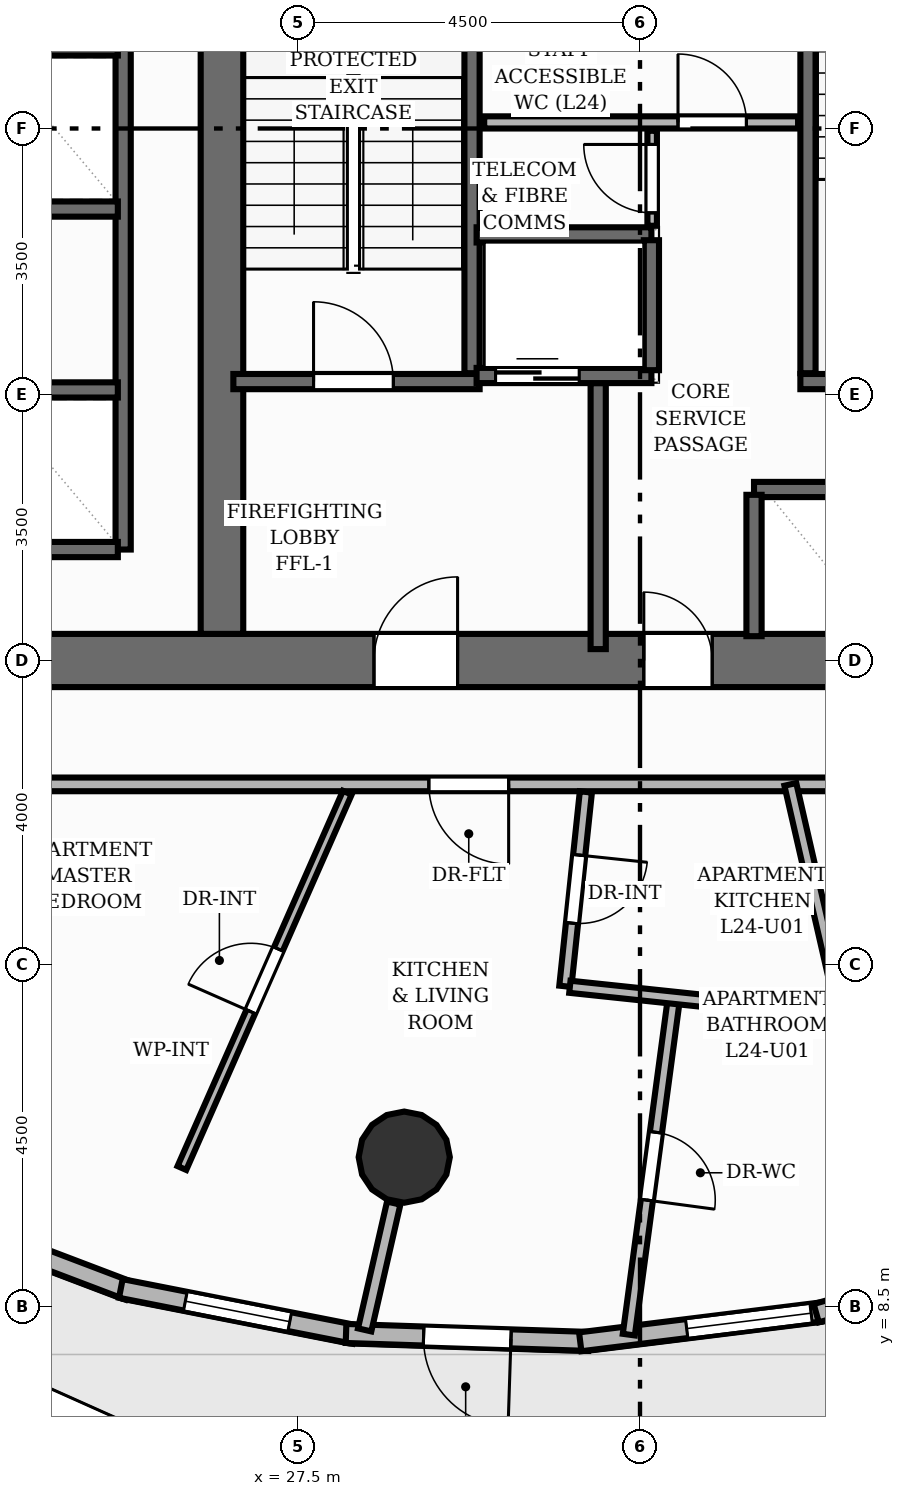
"""IFC4 building model, lengths in metres.
Left out: names, types, materials, properties, quantities, classifications, styles, units other than length and angle.
Written with IfcOpenShell. Run it as: python <this file> out.ifc"""

import sys

from ifc_helpers import new_model, si_unit, direction, frame, frame_2d, origin, origin_2d, place, context, subcontext, project, spatial, rectangle, circle, extrude, element, fill, save


model = new_model("IFC4")
c1 = context("Model", 3, precision=1e-05, world=origin(), true_north=direction((0.0, 1.0)))
c2 = subcontext(c1, "Body", "Model", "MODEL_VIEW")
j1 = project(units=[si_unit("LENGTHUNIT", "METRE"), si_unit("PLANEANGLEUNIT", "RADIAN")], contexts=[c1])
p1 = place(None, origin())
s1 = spatial("IfcSite", under=j1, at=p1, CompositionType="ELEMENT")
p2 = place(p1, origin())
s2 = spatial("IfcBuilding", under=s1, at=p2, CompositionType="ELEMENT")
p3 = place(p2, frame((0.0, 0.0, 83.68)))
s3 = spatial("IfcBuildingStorey", under=s2, at=p3, CompositionType="ELEMENT", Elevation=83.68)
p4 = place(p3, frame((22.65, 17.0, 0.0), z_axis=(0.0, 0.0, 1.0), x_axis=(1.0, 0.0, 0.0)))
e1 = element("IfcWall", 1, at=p4, inside=s3, PredefinedType="SHEAR", context=c2, shape_type="SweptSolid", body=[
    extrude(rectangle(XDim=18.7, YDim=0.7, at=frame_2d((9.35, 0.0))), origin(), (0.0, 0.0, 1.0), 3.2),
])
p5 = place(p4, frame((5.85, 0.0, 0.0)))
e2 = element("IfcOpeningElement", 2, at=p5, cuts=e1, PredefinedType="OPENING", context=c2, shape_type="SweptSolid", body=[
    extrude(rectangle(XDim=1.1, YDim=2.15, at=frame_2d((0.55, 1.075))), frame((0.0, 0.36, 0.0), z_axis=(0.0, -1.0, 0.0), x_axis=(1.0, 0.0, 0.0)), (0.0, 0.0, 1.0), 0.72),
])
p6 = place(p4, frame((9.4, 0.0, 0.0)))
e3 = element("IfcOpeningElement", 3, at=p6, cuts=e1, PredefinedType="OPENING", context=c2, shape_type="SweptSolid", body=[
    extrude(rectangle(XDim=0.9, YDim=2.1, at=frame_2d((0.45, 1.05))), frame((0.0, 0.36, 0.0), z_axis=(0.0, -1.0, 0.0), x_axis=(1.0, 0.0, 0.0)), (0.0, 0.0, 1.0), 0.72),
])
p7 = place(p3, frame((26.5, 17.35, 0.0), z_axis=(0.0, 0.0, 1.0), x_axis=(0.0, 1.0, 0.0)))
e4 = element("IfcWall", 4, at=p7, inside=s3, PredefinedType="SHEAR", context=c2, shape_type="SweptSolid", body=[
    extrude(rectangle(XDim=13.3, YDim=0.56, at=frame_2d((6.65, 0.0))), origin(), (0.0, 0.0, 1.0), 3.2),
])
p8 = place(p3, frame((28.898, 10.465, 0.0), z_axis=(0.0, 0.0, 1.0), x_axis=(1.0, 0.0, 0.0)))
e5 = element("IfcColumn", 5, at=p8, inside=s3, PredefinedType="COLUMN", context=c2, shape_type="SweptSolid", body=[
    extrude(circle(Radius=0.6, at=origin_2d()), origin(), (0.0, 0.0, 1.0), 3.2),
])
p9 = place(p3, frame((25.276, 8.707, 0.0), z_axis=(0.0, 0.0, 1.0), x_axis=(-0.934815891493, 0.355132720277, 0.0)))
e6 = element("IfcWall", 6, at=p9, inside=s3, PredefinedType="SOLIDWALL", context=c2, shape_type="SweptSolid", body=[
    extrude(rectangle(XDim=3.061, YDim=0.25, at=frame_2d((1.53, 0.0))), origin(), (0.0, 0.0, 1.0), 2.96),
])
p10 = place(p3, frame((28.242, 8.133, 0.0), z_axis=(0.0, 0.0, 1.0), x_axis=(-0.981187677549, 0.193056316721, 0.0)))
e7 = element("IfcWall", 7, at=p10, inside=s3, PredefinedType="SOLIDWALL", context=c2, shape_type="SweptSolid", body=[
    extrude(rectangle(XDim=3.131, YDim=0.25, at=frame_2d((1.565, 0.0))), origin(), (0.0, 0.0, 1.0), 2.96),
])
p11 = place(p10, frame((0.866, 0.0, 0.85)))
e8 = element("IfcOpeningElement", 8, at=p11, cuts=e7, PredefinedType="OPENING", context=c2, shape_type="SweptSolid", body=[
    extrude(rectangle(XDim=1.4, YDim=1.55, at=frame_2d((0.7, 0.775))), frame((0.0, 0.135, 0.0), z_axis=(0.0, -1.0, 0.0), x_axis=(1.0, 0.0, 0.0)), (0.0, 0.0, 1.0), 0.27),
])
p12 = place(p3, frame((31.323, 8.041, 0.0), z_axis=(0.0, 0.0, 1.0), x_axis=(-0.999464092211, 0.032734208101, 0.0)))
e9 = element("IfcWall", 9, at=p12, inside=s3, PredefinedType="SOLIDWALL", context=c2, shape_type="SweptSolid", body=[
    extrude(rectangle(XDim=3.192, YDim=0.25, at=frame_2d((1.596, 0.0))), origin(), (0.0, 0.0, 1.0), 2.96),
])
p13 = place(p12, frame((1.021, 0.0, 0.0)))
e10 = element("IfcOpeningElement", 10, at=p13, cuts=e9, PredefinedType="OPENING", context=c2, shape_type="SweptSolid", body=[
    extrude(rectangle(XDim=1.15, YDim=2.2, at=frame_2d((0.575, 1.1))), frame((0.0, 0.135, 0.0), z_axis=(0.0, -1.0, 0.0), x_axis=(1.0, 0.0, 0.0)), (0.0, 0.0, 1.0), 0.27),
])
p14 = place(p3, frame((34.425, 8.434, 0.0), z_axis=(0.0, 0.0, 1.0), x_axis=(-0.99241077266, -0.122966899235, 0.0)))
e11 = element("IfcWall", 11, at=p14, inside=s3, PredefinedType="SOLIDWALL", context=c2, shape_type="SweptSolid", body=[
    extrude(rectangle(XDim=3.236, YDim=0.25, at=frame_2d((1.618, 0.0))), origin(), (0.0, 0.0, 1.0), 2.96),
])
p15 = place(p14, frame((0.175, 0.0, 0.85)))
e12 = element("IfcOpeningElement", 12, at=p15, cuts=e11, PredefinedType="OPENING", context=c2, shape_type="SweptSolid", body=[
    extrude(rectangle(XDim=1.65, YDim=1.55, at=frame_2d((0.825, 0.775))), frame((0.0, 0.135, 0.0), z_axis=(0.0, -1.0, 0.0), x_axis=(1.0, 0.0, 0.0)), (0.0, 0.0, 1.0), 0.27),
])
p16 = place(p3, frame((37.455, 9.301, 0.0), z_axis=(0.0, 0.0, 1.0), x_axis=(-0.962134911526, -0.272573681825, 0.0)))
e13 = element("IfcWall", 13, at=p16, inside=s3, PredefinedType="SOLIDWALL", context=c2, shape_type="SweptSolid", body=[
    extrude(rectangle(XDim=3.26, YDim=0.25, at=frame_2d((1.63, 0.0))), origin(), (0.0, 0.0, 1.0), 2.96),
])
p17 = place(p3, frame((29.79, 20.78, 0.0), z_axis=(0.0, 0.0, 1.0), x_axis=(0.0, 1.0, 0.0)))
e14 = element("IfcWall", 14, at=p17, inside=s3, PredefinedType="SHEAR", context=c2, shape_type="SweptSolid", body=[
    extrude(rectangle(XDim=6.44, YDim=0.2, at=frame_2d((3.22, 0.0))), origin(), (0.0, 0.0, 1.0), 3.2),
])
p18 = place(p3, frame((26.65, 20.67, 0.0), z_axis=(0.0, 0.0, 1.0), x_axis=(1.0, 0.0, 0.0)))
e15 = element("IfcWall", 15, at=p18, inside=s3, PredefinedType="SHEAR", context=c2, shape_type="SweptSolid", body=[
    extrude(rectangle(XDim=3.24, YDim=0.2, at=frame_2d((1.62, 0.0))), origin(), (0.0, 0.0, 1.0), 3.2),
])
p19 = place(p18, frame((1.055, 0.0, 0.0)))
e16 = element("IfcOpeningElement", 16, at=p19, cuts=e15, PredefinedType="OPENING", context=c2, shape_type="SweptSolid", body=[
    extrude(rectangle(XDim=1.05, YDim=2.15, at=frame_2d((0.525, 1.075))), frame((0.0, 0.11, 0.0), z_axis=(0.0, -1.0, 0.0), x_axis=(1.0, 0.0, 0.0)), (0.0, 0.0, 1.0), 0.22),
])
p20 = place(p3, frame((34.21, 20.78, 0.0), z_axis=(0.0, 0.0, 1.0), x_axis=(0.0, 1.0, 0.0)))
e17 = element("IfcWall", 17, at=p20, inside=s3, PredefinedType="SHEAR", context=c2, shape_type="SweptSolid", body=[
    extrude(rectangle(XDim=6.44, YDim=0.2, at=frame_2d((3.22, 0.0))), origin(), (0.0, 0.0, 1.0), 3.2),
])
p21 = place(p3, frame((34.11, 20.67, 0.0), z_axis=(0.0, 0.0, 1.0), x_axis=(1.0, 0.0, 0.0)))
e18 = element("IfcWall", 18, at=p21, inside=s3, PredefinedType="SHEAR", context=c2, shape_type="SweptSolid", body=[
    extrude(rectangle(XDim=3.24, YDim=0.2, at=frame_2d((1.62, 0.0))), origin(), (0.0, 0.0, 1.0), 3.2),
])
p22 = place(p3, frame((31.45, 17.15, 0.0), z_axis=(0.0, 0.0, 1.0), x_axis=(0.0, 1.0, 0.0)))
e19 = element("IfcWall", 19, at=p22, inside=s3, PredefinedType="SHEAR", context=c2, shape_type="SweptSolid", body=[
    extrude(rectangle(XDim=3.5, YDim=0.2, at=frame_2d((1.75, 0.0))), origin(), (0.0, 0.0, 1.0), 3.2),
])
p23 = place(p3, frame((29.85, 20.75, 0.0), z_axis=(0.0, 0.0, 1.0), x_axis=(1.0, 0.0, 0.0)))
e20 = element("IfcWall", 20, at=p23, inside=s3, PredefinedType="SHEAR", context=c2, shape_type="SweptSolid", body=[
    extrude(rectangle(XDim=2.3, YDim=0.2, at=frame_2d((1.15, 0.0))), origin(), (0.0, 0.0, 1.0), 3.2),
])
p24 = place(p23, frame((0.25, 0.0, 0.0)))
e21 = element("IfcOpeningElement", 21, at=p24, cuts=e20, PredefinedType="OPENING", context=c2, shape_type="SweptSolid", body=[
    extrude(rectangle(XDim=1.1, YDim=2.15, at=frame_2d((0.55, 1.075))), frame((0.0, 0.11, 0.0), z_axis=(0.0, -1.0, 0.0), x_axis=(1.0, 0.0, 0.0)), (0.0, 0.0, 1.0), 0.22),
])
p25 = place(p3, frame((29.85, 22.6, 0.0), z_axis=(0.0, 0.0, 1.0), x_axis=(1.0, 0.0, 0.0)))
e22 = element("IfcWall", 22, at=p25, inside=s3, PredefinedType="SHEAR", context=c2, shape_type="SweptSolid", body=[
    extrude(rectangle(XDim=2.3, YDim=0.2, at=frame_2d((1.15, 0.0))), origin(), (0.0, 0.0, 1.0), 3.2),
])
p26 = place(p3, frame((32.15, 20.82, 0.0), z_axis=(0.0, 0.0, 1.0), x_axis=(0.0, 1.0, 0.0)))
e23 = element("IfcWall", 23, at=p26, inside=s3, PredefinedType="SHEAR", context=c2, shape_type="SweptSolid", body=[
    extrude(rectangle(XDim=1.71, YDim=0.2, at=frame_2d((0.855, 0.0))), origin(), (0.0, 0.0, 1.0), 3.2),
])
p27 = place(p3, frame((25.2, 18.46, 0.0), z_axis=(0.0, 0.0, 1.0), x_axis=(0.0, 1.0, 0.0)))
e24 = element("IfcWall", 24, at=p27, inside=s3, PredefinedType="SHEAR", context=c2, shape_type="SweptSolid", body=[
    extrude(rectangle(XDim=11.08, YDim=0.2, at=frame_2d((5.54, 0.0))), origin(), (0.0, 0.0, 1.0), 3.2),
])
for number, where, z_axis, x_axis in (
    (25, (23.42, 18.46, 0.0), (0.0, 0.0, 1.0), (1.0, 0.0, 0.0)),
    (26, (23.42, 20.56, 0.0), (0.0, 0.0, 1.0), (1.0, 0.0, 0.0)),
    (27, (23.42, 22.94, 0.0), (0.0, 0.0, 1.0), (1.0, 0.0, 0.0)),
    (28, (23.42, 25.06, 0.0), (0.0, 0.0, 1.0), (1.0, 0.0, 0.0)),
):
    element("IfcWall", number, at=place(p3, frame(where, z_axis=z_axis, x_axis=x_axis)), inside=s3, PredefinedType="SHEAR", context=c2, shape_type="SweptSolid", body=[
        extrude(rectangle(XDim=1.71, YDim=0.2, at=frame_2d((0.855, 0.0))), origin(), (0.0, 0.0, 1.0), 3.2),
    ])
p28 = place(p3, frame((33.5, 19.25, 0.0), z_axis=(0.0, 0.0, 1.0), x_axis=(1.0, 0.0, 0.0)))
e29 = element("IfcWall", 29, at=p28, inside=s3, PredefinedType="SHEAR", context=c2, shape_type="SweptSolid", body=[
    extrude(rectangle(XDim=3.72, YDim=0.2, at=frame_2d((1.86, 0.0))), origin(), (0.0, 0.0, 1.0), 3.2),
])
p29 = place(p3, frame((33.5, 17.32, 0.0), z_axis=(0.0, 0.0, 1.0), x_axis=(0.0, 1.0, 0.0)))
e30 = element("IfcWall", 30, at=p29, inside=s3, PredefinedType="SHEAR", context=c2, shape_type="SweptSolid", body=[
    extrude(rectangle(XDim=1.86, YDim=0.2, at=frame_2d((0.93, 0.0))), origin(), (0.0, 0.0, 1.0), 3.2),
])
p30 = place(p3, frame((29.95, 24.08, 0.0), z_axis=(0.0, 0.0, 1.0), x_axis=(1.0, 0.0, 0.0)))
e31 = element("IfcWall", 31, at=p30, inside=s3, PredefinedType="PLUMBINGWALL", context=c2, shape_type="SweptSolid", body=[
    extrude(rectangle(XDim=4.13, YDim=0.16, at=frame_2d((2.065, 0.0))), origin(), (0.0, 0.0, 1.0), 2.955),
])
p31 = place(p30, frame((2.55, 0.0, 0.0)))
e32 = element("IfcOpeningElement", 32, at=p31, cuts=e31, PredefinedType="OPENING", context=c2, shape_type="SweptSolid", body=[
    extrude(rectangle(XDim=0.9, YDim=2.1, at=frame_2d((0.45, 1.05))), frame((0.0, 0.09, 0.0), z_axis=(0.0, -1.0, 0.0), x_axis=(1.0, 0.0, 0.0)), (0.0, 0.0, 1.0), 0.18),
])
p32 = place(p3, frame((32.16, 22.72, 0.0), z_axis=(0.0, 0.0, 1.0), x_axis=(0.0, 1.0, 0.0)))
e33 = element("IfcWall", 33, at=p32, inside=s3, PredefinedType="PARTITIONING", context=c2, shape_type="SweptSolid", body=[
    extrude(rectangle(XDim=1.25, YDim=0.125, at=frame_2d((0.625, 0.0))), origin(), (0.0, 0.0, 1.0), 2.955),
])
p33 = place(p32, frame((0.17, 0.0, 0.0)))
e34 = element("IfcOpeningElement", 34, at=p33, cuts=e33, PredefinedType="OPENING", context=c2, shape_type="SweptSolid", body=[
    extrude(rectangle(XDim=0.9, YDim=2.1, at=frame_2d((0.45, 1.05))), frame((0.0, 0.073, 0.0), z_axis=(0.0, -1.0, 0.0), x_axis=(1.0, 0.0, 0.0)), (0.0, 0.0, 1.0), 0.145),
])
p34 = place(p3, frame((28.76, 9.861, 0.0), z_axis=(0.0, 0.0, 1.0), x_axis=(-0.223359217097, -0.974736200281, 0.0)))
e35 = element("IfcWall", 35, at=p34, inside=s3, PredefinedType="PARTITIONING", context=c2, shape_type="SweptSolid", body=[
    extrude(rectangle(XDim=1.712, YDim=0.18, at=frame_2d((0.856, 0.0))), origin(), (0.0, 0.0, 1.0), 2.261),
])
p35 = place(p3, frame((41.695, 15.37, 0.0), z_axis=(0.0, 0.0, 1.0), x_axis=(-1.0, 0.0, 0.0)))
e36 = element("IfcWall", 36, at=p35, inside=s3, PredefinedType="PARTITIONING", context=c2, shape_type="SweptSolid", body=[
    extrude(rectangle(XDim=20.325, YDim=0.18, at=frame_2d((10.163, 0.0))), origin(), (0.0, 0.0, 1.0), 2.955),
])
p36 = place(p35, frame((11.424, 0.0, 0.0)))
e37 = element("IfcOpeningElement", 37, at=p36, cuts=e36, PredefinedType="OPENING", context=c2, shape_type="SweptSolid", body=[
    extrude(rectangle(XDim=1.05, YDim=2.15, at=frame_2d((0.525, 1.075))), frame((0.0, 0.1, 0.0), z_axis=(0.0, -1.0, 0.0), x_axis=(1.0, 0.0, 0.0)), (0.0, 0.0, 1.0), 0.2),
])
p37 = place(p3, frame((32.448, 12.562, 0.0), z_axis=(0.0, 0.0, 1.0), x_axis=(-0.132986130607, -0.991117898671, 0.0)))
e38 = element("IfcWall", 38, at=p37, inside=s3, PredefinedType="PLUMBINGWALL", context=c2, shape_type="SweptSolid", body=[
    extrude(rectangle(XDim=4.472, YDim=0.16, at=frame_2d((2.236, 0.0))), origin(), (0.0, 0.0, 1.0), 2.955),
])
p38 = place(p37, frame((1.786, 0.0, 0.0)))
e39 = element("IfcOpeningElement", 39, at=p38, cuts=e38, PredefinedType="OPENING", context=c2, shape_type="SweptSolid", body=[
    extrude(rectangle(XDim=0.9, YDim=2.1, at=frame_2d((0.45, 1.05))), frame((0.0, 0.09, 0.0), z_axis=(0.0, -1.0, 0.0), x_axis=(1.0, 0.0, 0.0)), (0.0, 0.0, 1.0), 0.18),
])
p39 = place(p3, frame((25.973, 10.322, 0.0), z_axis=(0.0, 0.0, 1.0), x_axis=(0.403235845427, 0.91509608947, 0.0)))
e40 = element("IfcWall", 40, at=p39, inside=s3, PredefinedType="PARTITIONING", context=c2, shape_type="SweptSolid", body=[
    extrude(rectangle(XDim=5.396, YDim=0.125, at=frame_2d((2.698, 0.0))), origin(), (0.0, 0.0, 1.0), 2.955),
])
p40 = place(p39, frame((2.248, 0.0, 0.0)))
e41 = element("IfcOpeningElement", 41, at=p40, cuts=e40, PredefinedType="OPENING", context=c2, shape_type="SweptSolid", body=[
    extrude(rectangle(XDim=0.9, YDim=2.1, at=frame_2d((0.45, 1.05))), frame((0.0, 0.073, 0.0), z_axis=(0.0, -1.0, 0.0), x_axis=(1.0, 0.0, 0.0)), (0.0, 0.0, 1.0), 0.145),
])
p41 = place(p3, frame((31.288, 15.271, 0.0), z_axis=(0.0, 0.0, 1.0), x_axis=(-0.105094954285, -0.994462191631, 0.0)))
e42 = element("IfcWall", 42, at=p41, inside=s3, PredefinedType="PLUMBINGWALL", context=c2, shape_type="SweptSolid", body=[
    extrude(rectangle(XDim=2.572, YDim=0.16, at=frame_2d((1.286, 0.0))), origin(), (0.0, 0.0, 1.0), 2.641),
])
p42 = place(p41, frame((0.836, 0.0, 0.0)))
e43 = element("IfcOpeningElement", 43, at=p42, cuts=e42, PredefinedType="OPENING", context=c2, shape_type="SweptSolid", body=[
    extrude(rectangle(XDim=0.9, YDim=2.1, at=frame_2d((0.45, 1.05))), frame((0.0, 0.09, 0.0), z_axis=(0.0, -1.0, 0.0), x_axis=(1.0, 0.0, 0.0)), (0.0, 0.0, 1.0), 0.18),
])
p43 = place(p3, frame((31.077, 12.707, 0.0), z_axis=(0.0, 0.0, 1.0), x_axis=(0.994472124215, -0.105000924563, 0.0)))
e44 = element("IfcWall", 44, at=p43, inside=s3, PredefinedType="PLUMBINGWALL", context=c2, shape_type="SweptSolid", body=[
    extrude(rectangle(XDim=3.618, YDim=0.16, at=frame_2d((1.809, 0.0))), origin(), (0.0, 0.0, 1.0), 2.955),
])
p44 = place(p3, frame((33.978, 15.37, 0.0), z_axis=(0.0, 0.0, 1.0), x_axis=(0.223321757884, -0.974744783241, 0.0)))
e45 = element("IfcWall", 45, at=p44, inside=s3, PredefinedType="PLUMBINGWALL", context=c2, shape_type="SweptSolid", body=[
    extrude(rectangle(XDim=4.442, YDim=0.16, at=frame_2d((2.221, 0.0))), origin(), (0.0, 0.0, 1.0), 2.261),
])
p45 = place(p13, origin())
e46 = element("IfcDoor", 46, at=p45, inside=s3, OperationType="SINGLE_SWING_LEFT", PredefinedType="DOOR", context=c2, shape_type="SweptSolid", body=[
    extrude(rectangle(XDim=1.15, YDim=2.2, at=frame_2d((0.575, 1.1))), frame((0.0, 0.025, 0.0), z_axis=(0.0, -1.0, 0.0), x_axis=(1.0, 0.0, 0.0)), (0.0, 0.0, 1.0), 0.05),
])
fill(e10, e46)
p46 = place(p11, origin())
e47 = element("IfcWindow", 47, at=p46, inside=s3, PartitioningType="SINGLE_PANEL", PredefinedType="WINDOW", context=c2, shape_type="SweptSolid", body=[
    extrude(rectangle(XDim=1.4, YDim=1.55, at=frame_2d((0.7, 0.775))), frame((0.0, 0.03, 0.0), z_axis=(0.0, -1.0, 0.0), x_axis=(1.0, 0.0, 0.0)), (0.0, 0.0, 1.0), 0.06),
])
fill(e8, e47)
p47 = place(p15, origin())
e48 = element("IfcWindow", 48, at=p47, inside=s3, PartitioningType="SINGLE_PANEL", PredefinedType="WINDOW", context=c2, shape_type="SweptSolid", body=[
    extrude(rectangle(XDim=1.65, YDim=1.55, at=frame_2d((0.825, 0.775))), frame((0.0, 0.03, 0.0), z_axis=(0.0, -1.0, 0.0), x_axis=(1.0, 0.0, 0.0)), (0.0, 0.0, 1.0), 0.06),
])
fill(e12, e48)
p48 = place(p19, origin())
e49 = element("IfcDoor", 49, at=p48, inside=s3, OperationType="SINGLE_SWING_LEFT", PredefinedType="DOOR", context=c2, shape_type="SweptSolid", body=[
    extrude(rectangle(XDim=1.05, YDim=2.15, at=frame_2d((0.525, 1.075))), frame((0.0, 0.025, 0.0), z_axis=(0.0, -1.0, 0.0), x_axis=(1.0, 0.0, 0.0)), (0.0, 0.0, 1.0), 0.05),
])
fill(e16, e49)
p49 = place(p5, origin())
e50 = element("IfcDoor", 50, at=p49, inside=s3, OperationType="SINGLE_SWING_RIGHT", PredefinedType="DOOR", context=c2, shape_type="SweptSolid", body=[
    extrude(rectangle(XDim=1.1, YDim=2.15, at=frame_2d((0.55, 1.075))), frame((0.0, 0.025, 0.0), z_axis=(0.0, -1.0, 0.0), x_axis=(1.0, 0.0, 0.0)), (0.0, 0.0, 1.0), 0.05),
])
fill(e2, e50)
p50 = place(p24, origin())
e51 = element("IfcDoor", 51, at=p50, inside=s3, OperationType="DOUBLE_DOOR_SLIDING", PredefinedType="DOOR", context=c2, shape_type="SweptSolid", body=[
    extrude(rectangle(XDim=1.1, YDim=2.15, at=frame_2d((0.55, 1.075))), frame((0.0, 0.025, 0.0), z_axis=(0.0, -1.0, 0.0), x_axis=(1.0, 0.0, 0.0)), (0.0, 0.0, 1.0), 0.05),
])
fill(e21, e51)
p51 = place(p6, origin())
e52 = element("IfcDoor", 52, at=p51, inside=s3, OperationType="SINGLE_SWING_LEFT", PredefinedType="DOOR", context=c2, shape_type="SweptSolid", body=[
    extrude(rectangle(XDim=0.9, YDim=2.1, at=frame_2d((0.45, 1.05))), frame((0.0, 0.025, 0.0), z_axis=(0.0, -1.0, 0.0), x_axis=(1.0, 0.0, 0.0)), (0.0, 0.0, 1.0), 0.05),
])
fill(e3, e52)
p52 = place(p31, origin())
e53 = element("IfcDoor", 53, at=p52, inside=s3, OperationType="SINGLE_SWING_LEFT", PredefinedType="DOOR", context=c2, shape_type="SweptSolid", body=[
    extrude(rectangle(XDim=0.9, YDim=2.1, at=frame_2d((0.45, 1.05))), frame((0.0, 0.025, 0.0), z_axis=(0.0, -1.0, 0.0), x_axis=(1.0, 0.0, 0.0)), (0.0, 0.0, 1.0), 0.05),
])
fill(e32, e53)
p53 = place(p33, origin())
e54 = element("IfcDoor", 54, at=p53, inside=s3, OperationType="SINGLE_SWING_RIGHT", PredefinedType="DOOR", context=c2, shape_type="SweptSolid", body=[
    extrude(rectangle(XDim=0.9, YDim=2.1, at=frame_2d((0.45, 1.05))), frame((0.0, 0.025, 0.0), z_axis=(0.0, -1.0, 0.0), x_axis=(1.0, 0.0, 0.0)), (0.0, 0.0, 1.0), 0.05),
])
fill(e34, e54)
p54 = place(p36, origin())
e55 = element("IfcDoor", 55, at=p54, inside=s3, OperationType="SINGLE_SWING_LEFT", PredefinedType="DOOR", context=c2, shape_type="SweptSolid", body=[
    extrude(rectangle(XDim=1.05, YDim=2.15, at=frame_2d((0.525, 1.075))), frame((0.0, 0.025, 0.0), z_axis=(0.0, -1.0, 0.0), x_axis=(1.0, 0.0, 0.0)), (0.0, 0.0, 1.0), 0.05),
])
fill(e37, e55)
p55 = place(p38, origin())
e56 = element("IfcDoor", 56, at=p55, inside=s3, OperationType="SINGLE_SWING_RIGHT", PredefinedType="DOOR", context=c2, shape_type="SweptSolid", body=[
    extrude(rectangle(XDim=0.9, YDim=2.1, at=frame_2d((0.45, 1.05))), frame((0.0, 0.025, 0.0), z_axis=(0.0, -1.0, 0.0), x_axis=(1.0, 0.0, 0.0)), (0.0, 0.0, 1.0), 0.05),
])
fill(e39, e56)
p56 = place(p40, origin())
e57 = element("IfcDoor", 57, at=p56, inside=s3, OperationType="SINGLE_SWING_LEFT", PredefinedType="DOOR", context=c2, shape_type="SweptSolid", body=[
    extrude(rectangle(XDim=0.9, YDim=2.1, at=frame_2d((0.45, 1.05))), frame((0.0, 0.025, 0.0), z_axis=(0.0, -1.0, 0.0), x_axis=(1.0, 0.0, 0.0)), (0.0, 0.0, 1.0), 0.05),
])
fill(e41, e57)
p57 = place(p42, origin())
e58 = element("IfcDoor", 58, at=p57, inside=s3, OperationType="SINGLE_SWING_LEFT", PredefinedType="DOOR", context=c2, shape_type="SweptSolid", body=[
    extrude(rectangle(XDim=0.9, YDim=2.1, at=frame_2d((0.45, 1.05))), frame((0.0, 0.025, 0.0), z_axis=(0.0, -1.0, 0.0), x_axis=(1.0, 0.0, 0.0)), (0.0, 0.0, 1.0), 0.05),
])
fill(e43, e58)
save(model, sys.argv[1])
